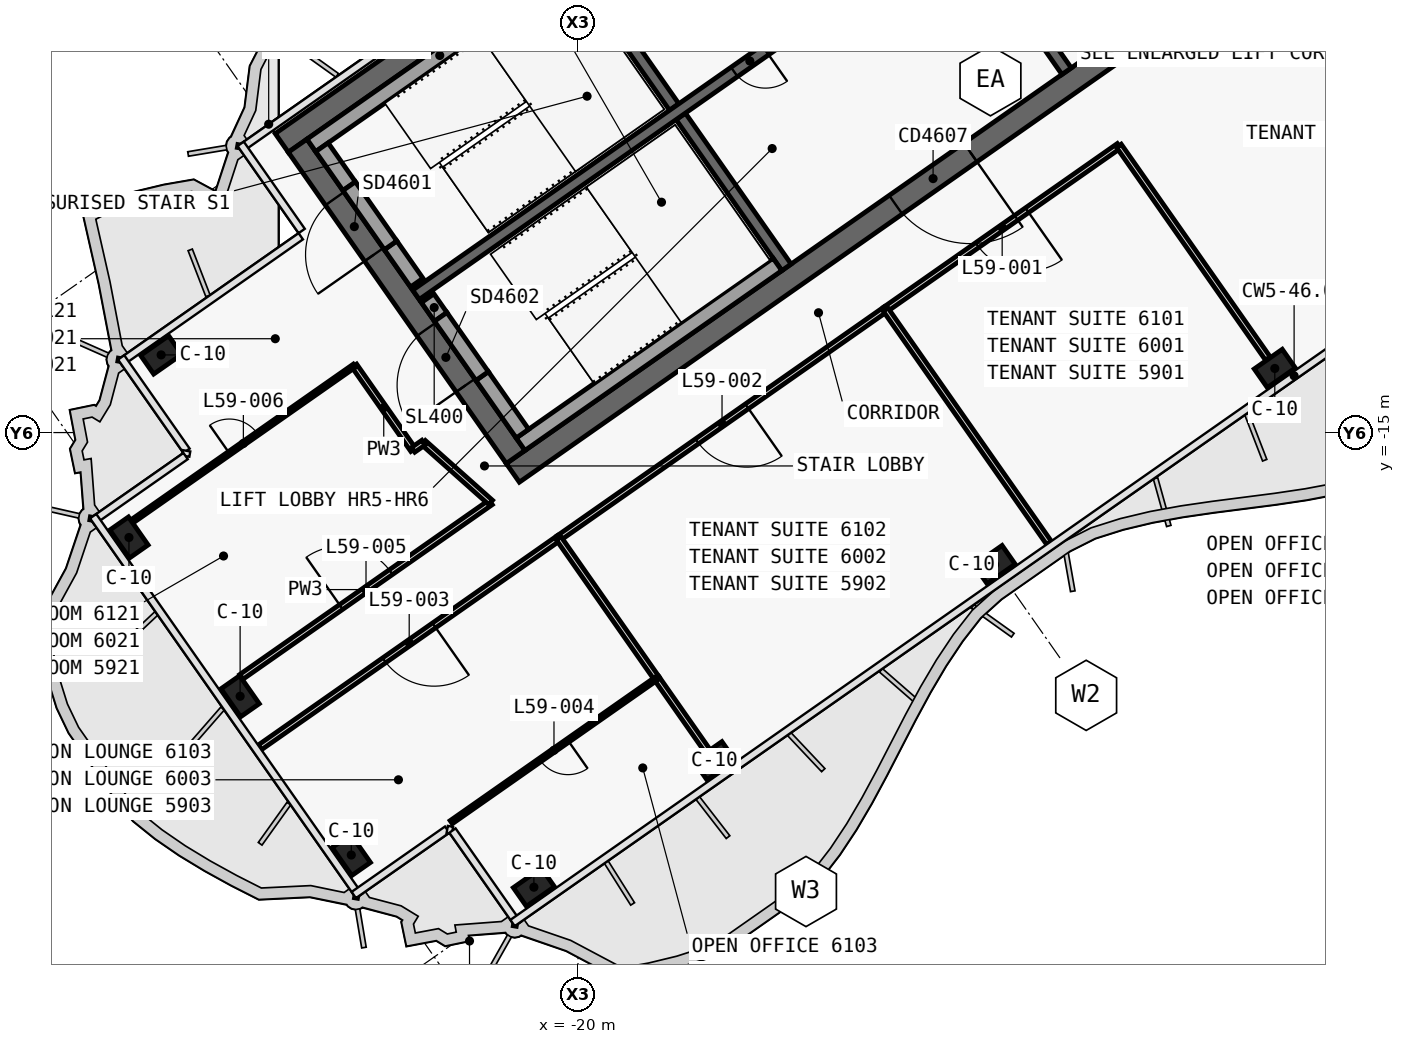
"""IFC4 building model, lengths in metres.
Left out: names, types, materials, properties, quantities, classifications, styles, units other than length and angle.
Written with IfcOpenShell. Run it as: python <this file> out.ifc"""

import sys

from ifc_helpers import new_model, si_unit, direction, frame, frame_2d, origin, origin_2d, place, context, subcontext, project, spatial, polyline, rectangle, outline, extrude, element, fill, save


model = new_model("IFC4")
c1 = context("Model", 3, precision=1e-05, world=origin(), true_north=direction((0.0, 1.0)))
c2 = subcontext(c1, "Body", "Model", "MODEL_VIEW")
j1 = project(units=[si_unit("LENGTHUNIT", "METRE"), si_unit("PLANEANGLEUNIT", "RADIAN")], contexts=[c1])
p1 = place(None, origin())
s1 = spatial("IfcSite", under=j1, at=p1, CompositionType="ELEMENT")
p2 = place(p1, origin())
s2 = spatial("IfcBuilding", under=s1, at=p2, CompositionType="ELEMENT")
p3 = place(p2, frame((0.0, 0.0, 252.7)))
s3 = spatial("IfcBuildingStorey", under=s2, at=p3, CompositionType="ELEMENT", Elevation=252.7)
p4 = place(p3, frame((-0.028, 12.066, 0.0), z_axis=(0.0, 0.0, 1.0), x_axis=(-0.819151382952, -0.573577380837, 0.0)))
e1 = element("IfcWall", 1, at=p4, inside=s3, PredefinedType="SHEAR", context=c2, shape_type="SweptSolid", body=[
    extrude(outline(polyline([(33.898, 0.3), (0.42, 0.3), (0.0, -0.3), (33.898, -0.3), (33.898, 0.3)])), origin(), (0.0, 0.0, 1.0), 3.9),
])
p5 = place(p3, frame((-0.028, -0.874, 0.0), z_axis=(0.0, 0.0, 1.0), x_axis=(-0.819150035022, -0.573579305871, 0.0)))
e2 = element("IfcWall", 2, at=p5, inside=s3, PredefinedType="SHEAR", context=c2, shape_type="SweptSolid", body=[
    extrude(outline(polyline([(26.476, 0.3), (0.42, 0.3), (0.0, -0.3), (26.476, -0.3), (26.476, 0.3)])), origin(), (0.0, 0.0, 1.0), 3.9),
])
p6 = place(p5, frame((2.976, 0.0, 0.0)))
e3 = element("IfcOpeningElement", 3, at=p6, cuts=e2, PredefinedType="OPENING", context=c2, shape_type="SweptSolid", body=[
    extrude(rectangle(XDim=2.4, YDim=2.1, at=frame_2d((1.2, 1.05))), frame((0.0, 0.31, 0.0), z_axis=(0.0, -1.0, 0.0), x_axis=(1.0, 0.0, 0.0)), (0.0, 0.0, 1.0), 0.62),
])
p7 = place(p5, frame((11.776, 0.0, 0.0)))
e4 = element("IfcOpeningElement", 4, at=p7, cuts=e2, PredefinedType="OPENING", context=c2, shape_type="SweptSolid", body=[
    extrude(rectangle(XDim=2.4, YDim=2.1, at=frame_2d((1.2, 1.05))), frame((0.0, 0.31, 0.0), z_axis=(0.0, -1.0, 0.0), x_axis=(1.0, 0.0, 0.0)), (0.0, 0.0, 1.0), 0.62),
])
p8 = place(p3, frame((-21.642, -15.642, 0.0), z_axis=(0.0, 0.0, 1.0), x_axis=(-0.573586866468, 0.819144740944, 0.0)))
e5 = element("IfcWall", 5, at=p8, inside=s3, PredefinedType="SHEAR", context=c2, shape_type="SweptSolid", body=[
    extrude(outline(polyline([(0.0, 0.3), (0.0, -0.3), (10.0, -0.3), (10.0, 0.3), (0.0, 0.3)])), origin(), (0.0, 0.0, 1.0), 3.9),
])
p9 = place(p8, frame((6.5, 0.0, 0.0)))
e6 = element("IfcOpeningElement", 6, at=p9, cuts=e5, PredefinedType="OPENING", context=c2, shape_type="SweptSolid", body=[
    extrude(rectangle(XDim=1.8, YDim=2.1, at=frame_2d((0.9, 1.05))), frame((0.0, 0.31, 0.0), z_axis=(0.0, -1.0, 0.0), x_axis=(1.0, 0.0, 0.0)), (0.0, 0.0, 1.0), 0.62),
])
p10 = place(p8, frame((2.3, 0.0, 0.0)))
e7 = element("IfcOpeningElement", 7, at=p10, cuts=e5, PredefinedType="OPENING", context=c2, shape_type="SweptSolid", body=[
    extrude(rectangle(XDim=1.8, YDim=2.1, at=frame_2d((0.9, 1.05))), frame((0.0, 0.31, 0.0), z_axis=(0.0, -1.0, 0.0), x_axis=(1.0, 0.0, 0.0)), (0.0, 0.0, 1.0), 0.62),
])
p11 = place(p3, frame((-7.143, -5.49, 0.0), z_axis=(0.0, 0.0, 1.0), x_axis=(-0.573617744349, 0.819123118565, 0.0)))
e8 = element("IfcWall", 8, at=p11, inside=s3, PredefinedType="SHEAR", context=c2, shape_type="SweptSolid", body=[
    extrude(outline(polyline([(4.85, 0.15), (0.0, 0.15), (0.0, -0.15), (4.85, -0.15), (4.85, 0.15)])), origin(), (0.0, 0.0, 1.0), 3.9),
])
p12 = place(p3, frame((-14.515, -10.652, 0.0), z_axis=(0.0, 0.0, 1.0), x_axis=(-0.573560315113, 0.819163332265, 0.0)))
e9 = element("IfcWall", 9, at=p12, inside=s3, PredefinedType="SHEAR", context=c2, shape_type="SweptSolid", body=[
    extrude(outline(polyline([(4.85, 0.15), (0.0, 0.15), (0.0, -0.15), (4.85, -0.15), (4.85, 0.15)])), origin(), (0.0, 0.0, 1.0), 3.9),
])
p13 = place(p3, frame((-17.469, -6.433, 0.0), z_axis=(0.0, 0.0, 1.0), x_axis=(-0.573594092424, 0.81913968109, 0.0)))
e10 = element("IfcWall", 10, at=p13, inside=s3, PredefinedType="SHEAR", context=c2, shape_type="SweptSolid", body=[
    extrude(outline(polyline([(4.85, -0.15), (4.85, 0.15), (0.0, 0.15), (0.0, -0.15), (4.85, -0.15)])), origin(), (0.0, 0.0, 1.0), 3.9),
])
p14 = place(p3, frame((-2.638, 3.768, 0.0), z_axis=(0.0, 0.0, 1.0), x_axis=(-0.819155014212, -0.573572194837, 0.0)))
e11 = element("IfcWall", 11, at=p14, inside=s3, PredefinedType="SHEAR", context=c2, shape_type="SweptSolid", body=[
    extrude(outline(polyline([(26.4, 0.15), (0.0, 0.15), (0.0, -0.15), (26.4, -0.15), (26.4, 0.15)])), origin(), (0.0, 0.0, 1.0), 3.9),
])
p15 = place(p14, frame((1.169, 0.0, 0.0)))
e12 = element("IfcOpeningElement", 12, at=p15, cuts=e11, PredefinedType="OPENING", context=c2, shape_type="SweptSolid", body=[
    extrude(rectangle(XDim=1.1, YDim=2.1, at=frame_2d((0.55, 1.05))), frame((0.0, 0.16, 0.0), z_axis=(0.0, -1.0, 0.0), x_axis=(1.0, 0.0, 0.0)), (0.0, 0.0, 1.0), 0.32),
])
p16 = place(p14, frame((3.206, 0.0, 0.0)))
e13 = element("IfcOpeningElement", 13, at=p16, cuts=e11, PredefinedType="OPENING", context=c2, shape_type="SweptSolid", body=[
    extrude(rectangle(XDim=1.1, YDim=2.1, at=frame_2d((0.55, 1.05))), frame((0.0, 0.16, 0.0), z_axis=(0.0, -1.0, 0.0), x_axis=(1.0, 0.0, 0.0)), (0.0, 0.0, 1.0), 0.32),
])
p17 = place(p14, frame((5.244, 0.0, 0.0)))
e14 = element("IfcOpeningElement", 14, at=p17, cuts=e11, PredefinedType="OPENING", context=c2, shape_type="SweptSolid", body=[
    extrude(rectangle(XDim=1.1, YDim=2.1, at=frame_2d((0.55, 1.05))), frame((0.0, 0.16, 0.0), z_axis=(0.0, -1.0, 0.0), x_axis=(1.0, 0.0, 0.0)), (0.0, 0.0, 1.0), 0.32),
])
p18 = place(p14, frame((7.281, 0.0, 0.0)))
e15 = element("IfcOpeningElement", 15, at=p18, cuts=e11, PredefinedType="OPENING", context=c2, shape_type="SweptSolid", body=[
    extrude(rectangle(XDim=1.1, YDim=2.1, at=frame_2d((0.55, 1.05))), frame((0.0, 0.16, 0.0), z_axis=(0.0, -1.0, 0.0), x_axis=(1.0, 0.0, 0.0)), (0.0, 0.0, 1.0), 0.32),
])
p19 = place(p14, frame((9.688, 0.0, 0.0)))
e16 = element("IfcOpeningElement", 16, at=p19, cuts=e11, PredefinedType="OPENING", context=c2, shape_type="SweptSolid", body=[
    extrude(rectangle(XDim=1.1, YDim=2.1, at=frame_2d((0.55, 1.05))), frame((0.0, 0.16, 0.0), z_axis=(0.0, -1.0, 0.0), x_axis=(1.0, 0.0, 0.0)), (0.0, 0.0, 1.0), 0.32),
])
p20 = place(p14, frame((11.863, 0.0, 0.0)))
e17 = element("IfcOpeningElement", 17, at=p20, cuts=e11, PredefinedType="OPENING", context=c2, shape_type="SweptSolid", body=[
    extrude(rectangle(XDim=1.1, YDim=2.1, at=frame_2d((0.55, 1.05))), frame((0.0, 0.16, 0.0), z_axis=(0.0, -1.0, 0.0), x_axis=(1.0, 0.0, 0.0)), (0.0, 0.0, 1.0), 0.32),
])
p21 = place(p14, frame((15.175, 0.0, 0.0)))
e18 = element("IfcOpeningElement", 18, at=p21, cuts=e11, PredefinedType="OPENING", context=c2, shape_type="SweptSolid", body=[
    extrude(rectangle(XDim=1.0, YDim=2.1, at=frame_2d((0.5, 1.05))), frame((0.0, 0.16, 0.0), z_axis=(0.0, -1.0, 0.0), x_axis=(1.0, 0.0, 0.0)), (0.0, 0.0, 1.0), 0.32),
])
for number, where, z_axis, x_axis in (
    (19, (-1.665, -13.313, 0.0), (0.0, 0.0, 1.0), (-0.819, -0.574, 0.0)),
    (20, (-9.038, -18.475, 0.0), (0.0, 0.0, 1.0), (-0.819, -0.574, 0.0)),
    (21, (-16.41, -23.637, 0.0), (0.0, 0.0, 1.0), (-0.819, -0.574, 0.0)),
    (22, (-21.161, -26.964, 0.0), (0.0, 0.0, 1.0), (-0.819, -0.574, 0.0)),
    (23, (-30.969, -12.956, 0.0), (0.0, 0.0, 1.0), (-0.819, -0.574, 0.0)),
    (24, (-25.966, -26.117, 0.0), (0.0, 0.0, 1.0), (-0.574, 0.819, 0.0)),
    (25, (-28.891, -21.939, 0.0), (0.0, 0.0, 1.0), (-0.574, 0.819, 0.0)),
    (26, (-31.816, -17.761, 0.0), (0.0, 0.0, 1.0), (-0.574, 0.819, 0.0)),
):
    element("IfcColumn", number, at=place(p3, frame(where, z_axis=z_axis, x_axis=x_axis)), inside=s3, PredefinedType="COLUMN", context=c2, shape_type="SweptSolid", body=[
        extrude(rectangle(XDim=0.9, YDim=0.6, at=origin_2d()), origin(), (0.0, 0.0, 1.0), 3.9),
    ])
p22 = place(p3, frame((-20.259, -2.71, 0.0), z_axis=(0.0, 0.0, 1.0), x_axis=(-0.81914849389, -0.573581506813, 0.0)))
e27 = element("IfcWall", 27, at=p22, inside=s3, PredefinedType="SOLIDWALL", context=c2, shape_type="SweptSolid", body=[
    extrude(rectangle(XDim=8.25, YDim=0.4, at=frame_2d((4.125, 0.0))), origin(), (0.0, 0.0, 1.0), 3.62),
])
p23 = place(p3, frame((-24.244, -11.055, 0.0), z_axis=(0.0, 0.0, 1.0), x_axis=(-0.573571582932, 0.819155442668, 0.0)))
e28 = element("IfcWall", 28, at=p23, inside=s3, PredefinedType="SOLIDWALL", context=c2, shape_type="SweptSolid", body=[
    extrude(rectangle(XDim=1.2, YDim=0.4, at=frame_2d((0.6, 0.0))), origin(), (0.0, 0.0, 1.0), 3.62),
])
p24 = place(p3, frame((-26.022, -8.515, 0.0), z_axis=(0.0, 0.0, 1.0), x_axis=(-0.573619628835, 0.819121798889, 0.0)))
e29 = element("IfcWall", 29, at=p24, inside=s3, PredefinedType="SOLIDWALL", context=c2, shape_type="SweptSolid", body=[
    extrude(rectangle(XDim=1.25, YDim=0.4, at=frame_2d((0.625, 0.0))), origin(), (0.0, 0.0, 1.0), 3.62),
])
p25 = place(p3, frame((-24.932, -10.072, 2.15), z_axis=(0.0, 0.0, 1.0), x_axis=(-0.573591692345, 0.819141361715, 0.0)))
e30 = element("IfcWall", 30, at=p25, inside=s3, PredefinedType="SOLIDWALL", context=c2, shape_type="SweptSolid", body=[
    extrude(rectangle(XDim=1.9, YDim=0.4, at=frame_2d((0.95, 0.0))), origin(), (0.0, 0.0, 1.0), 1.47),
])
p26 = place(p3, frame((-14.753, -10.574, 0.0), z_axis=(0.0, 0.0, 1.0), x_axis=(-0.819158229677, -0.573567602601, 0.0)))
e31 = element("IfcWall", 31, at=p26, inside=s3, PredefinedType="SOLIDWALL", context=c2, shape_type="SweptSolid", body=[
    extrude(rectangle(XDim=8.25, YDim=0.4, at=frame_2d((4.125, 0.0))), origin(), (0.0, 0.0, 1.0), 3.62),
])
p27 = place(p3, frame((-21.462, -15.028, 0.0), z_axis=(0.0, 0.0, 1.0), x_axis=(-0.573559770908, 0.819163713305, 0.0)))
e32 = element("IfcWall", 32, at=p27, inside=s3, PredefinedType="SOLIDWALL", context=c2, shape_type="SweptSolid", body=[
    extrude(rectangle(XDim=1.85, YDim=0.4, at=frame_2d((0.925, 0.0))), origin(), (0.0, 0.0, 1.0), 3.62),
])
p28 = place(p3, frame((-23.613, -11.956, 0.0), z_axis=(0.0, 0.0, 1.0), x_axis=(-0.573435029941, 0.819251039936, 0.0)))
e33 = element("IfcWall", 33, at=p28, inside=s3, PredefinedType="SOLIDWALL", context=c2, shape_type="SweptSolid", body=[
    extrude(rectangle(XDim=0.6, YDim=0.4, at=frame_2d((0.3, 0.0))), origin(), (0.0, 0.0, 1.0), 3.62),
])
p29 = place(p3, frame((-22.523, -13.512, 2.15), z_axis=(0.0, 0.0, 1.0), x_axis=(-0.573591692345, 0.819141361715, 0.0)))
e34 = element("IfcWall", 34, at=p29, inside=s3, PredefinedType="SOLIDWALL", context=c2, shape_type="SweptSolid", body=[
    extrude(rectangle(XDim=1.9, YDim=0.4, at=frame_2d((0.95, 0.0))), origin(), (0.0, 0.0, 1.0), 1.47),
])
p30 = place(p3, frame((-28.858, -21.428, 0.0), z_axis=(0.0, 0.0, 1.0), x_axis=(0.819138799838, 0.573595350923, 0.0)))
e35 = element("IfcWall", 35, at=p30, inside=s3, PredefinedType="PARTITIONING", context=c2, shape_type="SweptSolid", body=[
    extrude(rectangle(XDim=8.007, YDim=0.15, at=frame_2d((4.003, 0.0))), origin(), (0.0, 0.0, 1.0), 3.05),
])
p31 = place(p30, frame((3.204, 0.0, 0.0)))
e36 = element("IfcOpeningElement", 36, at=p31, cuts=e35, PredefinedType="OPENING", context=c2, shape_type="SweptSolid", body=[
    extrude(rectangle(XDim=1.6, YDim=2.1, at=frame_2d((0.8, 1.05))), frame((0.0, 0.085, 0.0), z_axis=(0.0, -1.0, 0.0), x_axis=(1.0, 0.0, 0.0)), (0.0, 0.0, 1.0), 0.17),
])
p32 = place(p3, frame((-5.766, -7.456, 0.0), z_axis=(0.0, 0.0, 1.0), x_axis=(-0.819150881364, -0.573578097177, 0.0)))
e37 = element("IfcWall", 37, at=p32, inside=s3, PredefinedType="PARTITIONING", context=c2, shape_type="SweptSolid", body=[
    extrude(rectangle(XDim=7.502, YDim=0.15, at=frame_2d((3.751, 0.0))), origin(), (0.0, 0.0, 1.0), 3.05),
])
p33 = place(p32, frame((2.951, 0.0, 0.0)))
e38 = element("IfcOpeningElement", 38, at=p33, cuts=e37, PredefinedType="OPENING", context=c2, shape_type="SweptSolid", body=[
    extrude(rectangle(XDim=1.6, YDim=2.1, at=frame_2d((0.8, 1.05))), frame((0.0, 0.085, 0.0), z_axis=(0.0, -1.0, 0.0), x_axis=(1.0, 0.0, 0.0)), (0.0, 0.0, 1.0), 0.17),
])
p34 = place(p3, frame((-11.908, -11.757, 0.0), z_axis=(0.0, 0.0, 1.0), x_axis=(-0.819156568366, -0.573569975245, 0.0)))
e39 = element("IfcWall", 39, at=p34, inside=s3, PredefinedType="PARTITIONING", context=c2, shape_type="SweptSolid", body=[
    extrude(rectangle(XDim=10.504, YDim=0.15, at=frame_2d((5.252, 0.0))), origin(), (0.0, 0.0, 1.0), 3.05),
])
p35 = place(p34, frame((4.452, 0.0, 0.0)))
e40 = element("IfcOpeningElement", 40, at=p35, cuts=e39, PredefinedType="OPENING", context=c2, shape_type="SweptSolid", body=[
    extrude(rectangle(XDim=1.6, YDim=2.1, at=frame_2d((0.8, 1.05))), frame((0.0, 0.085, 0.0), z_axis=(0.0, -1.0, 0.0), x_axis=(1.0, 0.0, 0.0)), (0.0, 0.0, 1.0), 0.17),
])
p36 = place(p3, frame((-20.51, -17.779, 0.0), z_axis=(0.0, 0.0, 1.0), x_axis=(-0.819147101588, -0.573583495196, 0.0)))
e41 = element("IfcWall", 41, at=p36, inside=s3, PredefinedType="PARTITIONING", context=c2, shape_type="SweptSolid", body=[
    extrude(rectangle(XDim=9.602, YDim=0.15, at=frame_2d((4.801, 0.0))), origin(), (0.0, 0.0, 1.0), 3.0),
])
p37 = place(p36, frame((4.001, 0.0, 0.0)))
e42 = element("IfcOpeningElement", 42, at=p37, cuts=e41, PredefinedType="OPENING", context=c2, shape_type="SweptSolid", body=[
    extrude(rectangle(XDim=1.6, YDim=2.1, at=frame_2d((0.8, 1.05))), frame((0.0, 0.085, 0.0), z_axis=(0.0, -1.0, 0.0), x_axis=(1.0, 0.0, 0.0)), (0.0, 0.0, 1.0), 0.17),
])
p38 = place(p3, frame((-1.849, -13.051, 0.0), z_axis=(0.0, 0.0, 1.0), x_axis=(-0.57357985571, 0.819149650018, 0.0)))
e43 = element("IfcWall", 43, at=p38, inside=s3, PredefinedType="PARTITIONING", context=c2, shape_type="SweptSolid", body=[
    extrude(rectangle(XDim=6.832, YDim=0.15, at=frame_2d((3.416, 0.0))), origin(), (0.0, 0.0, 1.0), 3.05),
])
p39 = place(p3, frame((-24.337, -15.454, 0.0), z_axis=(0.0, 0.0, 1.0), x_axis=(-0.573571492575, 0.819155505936, 0.0)))
e44 = element("IfcWall", 44, at=p39, inside=s3, PredefinedType="PARTITIONING", context=c2, shape_type="SweptSolid", body=[
    extrude(rectangle(XDim=2.702, YDim=0.15, at=frame_2d((1.351, 0.0))), origin(), (0.0, 0.0, 1.0), 3.62),
])
p40 = place(p3, frame((-22.3, -16.837, 0.0), z_axis=(0.0, 0.0, 1.0), x_axis=(-0.746942190663, 0.664888986078, 0.0)))
e45 = element("IfcWall", 45, at=p40, inside=s3, PredefinedType="PARTITIONING", context=c2, shape_type="SweptSolid", body=[
    extrude(rectangle(XDim=2.365, YDim=0.15, at=frame_2d((1.183, 0.0))), origin(), (0.0, 0.0, 1.0), 3.62),
])
p41 = place(p3, frame((-24.067, -15.265, 0.0), z_axis=(0.0, 0.0, 1.0), x_axis=(-0.819092976344, -0.573660784876, 0.0)))
e46 = element("IfcWall", 46, at=p41, inside=s3, PredefinedType="PARTITIONING", context=c2, shape_type="SweptSolid", body=[
    extrude(rectangle(XDim=0.33, YDim=0.15, at=frame_2d((0.165, 0.0))), origin(), (0.0, 0.0, 1.0), 3.62),
])
p42 = place(p3, frame((-31.727, -17.331, 0.0), z_axis=(0.0, 0.0, 1.0), x_axis=(0.819140241507, 0.573593292101, 0.0)))
e47 = element("IfcWall", 47, at=p42, inside=s3, PredefinedType="PARTITIONING", context=c2, shape_type="SweptSolid", body=[
    extrude(rectangle(XDim=7.132, YDim=0.1, at=frame_2d((3.566, 0.0))), origin(), (0.0, 0.0, 1.0), 3.0),
])
p43 = place(p42, frame((3.116, 0.0, 0.0)))
e48 = element("IfcOpeningElement", 48, at=p43, cuts=e47, PredefinedType="OPENING", context=c2, shape_type="SweptSolid", body=[
    extrude(rectangle(XDim=0.9, YDim=2.1, at=frame_2d((0.45, 1.05))), frame((0.0, 0.06, 0.0), z_axis=(0.0, -1.0, 0.0), x_axis=(1.0, 0.0, 0.0)), (0.0, 0.0, 1.0), 0.12),
])
p44 = place(p3, frame((-7.608, -17.901, 0.0), z_axis=(0.0, 0.0, 1.0), x_axis=(-0.573560650686, 0.819163097304, 0.0)))
e49 = element("IfcWall", 49, at=p44, inside=s3, PredefinedType="PARTITIONING", context=c2, shape_type="SweptSolid", body=[
    extrude(rectangle(XDim=7.5, YDim=0.15, at=frame_2d((3.75, 0.0))), origin(), (0.0, 0.0, 1.0), 3.0),
])
p45 = place(p3, frame((-16.594, -23.375, 0.0), z_axis=(0.0, 0.0, 1.0), x_axis=(-0.57362400197, 0.819118736426, 0.0)))
e50 = element("IfcWall", 50, at=p45, inside=s3, PredefinedType="PARTITIONING", context=c2, shape_type="SweptSolid", body=[
    extrude(rectangle(XDim=2.331, YDim=0.15, at=frame_2d((1.166, 0.0))), origin(), (0.0, 0.0, 1.0), 3.05),
])
p46 = place(p3, frame((-17.929, -21.468, 0.0), z_axis=(0.0, 0.0, 1.0), x_axis=(-0.573553333433, 0.819168220641, 0.0)))
e51 = element("IfcWall", 51, at=p46, inside=s3, PredefinedType="PARTITIONING", context=c2, shape_type="SweptSolid", body=[
    extrude(rectangle(XDim=4.502, YDim=0.15, at=frame_2d((2.251, 0.0))), origin(), (0.0, 0.0, 1.0), 3.05),
])
p47 = place(p3, frame((-17.929, -21.467, 0.0), z_axis=(0.0, 0.0, 1.0), x_axis=(-0.819158922237, -0.573566613498, 0.0)))
e52 = element("IfcWall", 52, at=p47, inside=s3, PredefinedType="PARTITIONING", context=c2, shape_type="SweptSolid", body=[
    extrude(rectangle(XDim=6.6, YDim=0.1, at=frame_2d((3.3, 0.0))), origin(), (0.0, 0.0, 1.0), 3.05),
])
p48 = place(p47, frame((2.85, 0.0, 0.0)))
e53 = element("IfcOpeningElement", 53, at=p48, cuts=e52, PredefinedType="OPENING", context=c2, shape_type="SweptSolid", body=[
    extrude(rectangle(XDim=0.9, YDim=2.1, at=frame_2d((0.45, 1.05))), frame((0.0, 0.06, 0.0), z_axis=(0.0, -1.0, 0.0), x_axis=(1.0, 0.0, 0.0)), (0.0, 0.0, 1.0), 0.12),
])
p49 = place(p21, origin())
e54 = element("IfcDoor", 54, at=p49, inside=s3, OperationType="SINGLE_SWING_RIGHT", PredefinedType="DOOR", context=c2, shape_type="SweptSolid", body=[
    extrude(rectangle(XDim=1.0, YDim=2.1, at=frame_2d((0.5, 1.05))), frame((0.0, 0.025, 0.0), z_axis=(0.0, -1.0, 0.0), x_axis=(1.0, 0.0, 0.0)), (0.0, 0.0, 1.0), 0.05),
])
fill(e18, e54)
p50 = place(p7, origin())
e55 = element("IfcDoor", 55, at=p50, inside=s3, OperationType="DOUBLE_DOOR_SINGLE_SWING", PredefinedType="DOOR", context=c2, shape_type="SweptSolid", body=[
    extrude(rectangle(XDim=2.4, YDim=2.1, at=frame_2d((1.2, 1.05))), frame((0.0, 0.025, 0.0), z_axis=(0.0, -1.0, 0.0), x_axis=(1.0, 0.0, 0.0)), (0.0, 0.0, 1.0), 0.05),
])
fill(e4, e55)
p51 = place(p9, origin())
e56 = element("IfcDoor", 56, at=p51, inside=s3, OperationType="DOUBLE_DOOR_SINGLE_SWING", PredefinedType="DOOR", context=c2, shape_type="SweptSolid", body=[
    extrude(rectangle(XDim=1.8, YDim=2.1, at=frame_2d((0.9, 1.05))), frame((0.0, 0.025, 0.0), z_axis=(0.0, -1.0, 0.0), x_axis=(1.0, 0.0, 0.0)), (0.0, 0.0, 1.0), 0.05),
])
fill(e6, e56)
p52 = place(p10, origin())
e57 = element("IfcDoor", 57, at=p52, inside=s3, OperationType="DOUBLE_DOOR_SINGLE_SWING", PredefinedType="DOOR", context=c2, shape_type="SweptSolid", body=[
    extrude(rectangle(XDim=1.8, YDim=2.1, at=frame_2d((0.9, 1.05))), frame((0.0, 0.025, 0.0), z_axis=(0.0, -1.0, 0.0), x_axis=(1.0, 0.0, 0.0)), (0.0, 0.0, 1.0), 0.05),
])
fill(e7, e57)
p53 = place(p33, origin())
e58 = element("IfcDoor", 58, at=p53, inside=s3, OperationType="DOUBLE_DOOR_SINGLE_SWING", PredefinedType="DOOR", context=c2, shape_type="SweptSolid", body=[
    extrude(rectangle(XDim=1.6, YDim=2.1, at=frame_2d((0.8, 1.05))), frame((0.0, 0.025, 0.0), z_axis=(0.0, -1.0, 0.0), x_axis=(1.0, 0.0, 0.0)), (0.0, 0.0, 1.0), 0.05),
])
fill(e38, e58)
p54 = place(p35, origin())
e59 = element("IfcDoor", 59, at=p54, inside=s3, OperationType="DOUBLE_DOOR_SINGLE_SWING", PredefinedType="DOOR", context=c2, shape_type="SweptSolid", body=[
    extrude(rectangle(XDim=1.6, YDim=2.1, at=frame_2d((0.8, 1.05))), frame((0.0, 0.025, 0.0), z_axis=(0.0, -1.0, 0.0), x_axis=(1.0, 0.0, 0.0)), (0.0, 0.0, 1.0), 0.05),
])
fill(e40, e59)
p55 = place(p37, origin())
e60 = element("IfcDoor", 60, at=p55, inside=s3, OperationType="DOUBLE_DOOR_SINGLE_SWING", PredefinedType="DOOR", context=c2, shape_type="SweptSolid", body=[
    extrude(rectangle(XDim=1.6, YDim=2.1, at=frame_2d((0.8, 1.05))), frame((0.0, 0.025, 0.0), z_axis=(0.0, -1.0, 0.0), x_axis=(1.0, 0.0, 0.0)), (0.0, 0.0, 1.0), 0.05),
])
fill(e42, e60)
p56 = place(p48, origin())
e61 = element("IfcDoor", 61, at=p56, inside=s3, OperationType="SINGLE_SWING_LEFT", PredefinedType="DOOR", context=c2, shape_type="SweptSolid", body=[
    extrude(rectangle(XDim=0.9, YDim=2.1, at=frame_2d((0.45, 1.05))), frame((0.0, 0.025, 0.0), z_axis=(0.0, -1.0, 0.0), x_axis=(1.0, 0.0, 0.0)), (0.0, 0.0, 1.0), 0.05),
])
fill(e53, e61)
p57 = place(p31, origin())
e62 = element("IfcDoor", 62, at=p57, inside=s3, OperationType="DOUBLE_DOOR_SINGLE_SWING", PredefinedType="DOOR", context=c2, shape_type="SweptSolid", body=[
    extrude(rectangle(XDim=1.6, YDim=2.1, at=frame_2d((0.8, 1.05))), frame((0.0, 0.025, 0.0), z_axis=(0.0, -1.0, 0.0), x_axis=(1.0, 0.0, 0.0)), (0.0, 0.0, 1.0), 0.05),
])
fill(e36, e62)
p58 = place(p43, origin())
e63 = element("IfcDoor", 63, at=p58, inside=s3, OperationType="SINGLE_SWING_RIGHT", PredefinedType="DOOR", context=c2, shape_type="SweptSolid", body=[
    extrude(rectangle(XDim=0.9, YDim=2.1, at=frame_2d((0.45, 1.05))), frame((0.0, 0.025, 0.0), z_axis=(0.0, -1.0, 0.0), x_axis=(1.0, 0.0, 0.0)), (0.0, 0.0, 1.0), 0.05),
])
fill(e48, e63)
save(model, sys.argv[1])
